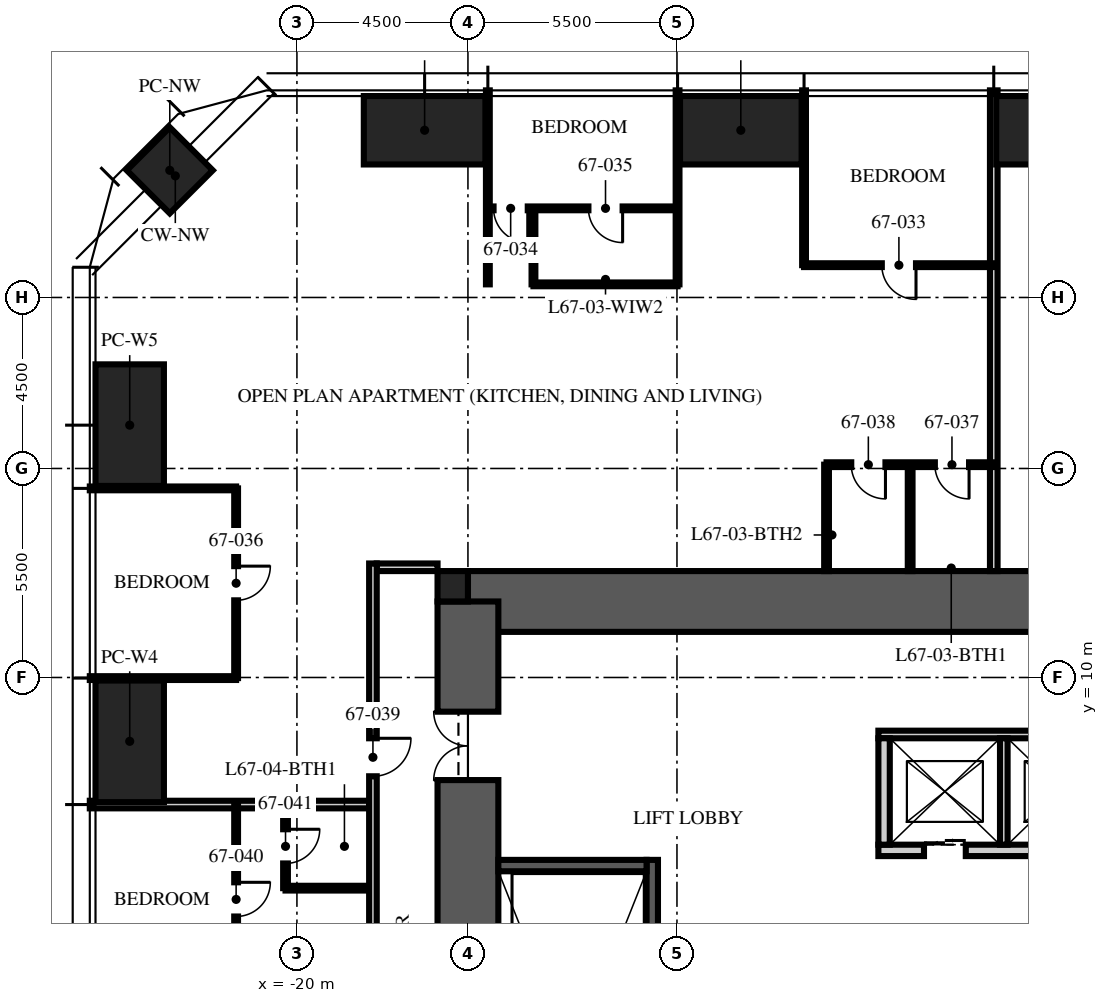
"""IFC4 building model, lengths in metres.
Left out: names, types, materials, properties, quantities, classifications, styles, units other than length and angle.
Written with IfcOpenShell. Run it as: python <this file> out.ifc"""

import sys

from ifc_helpers import new_model, si_unit, direction, frame, frame_2d, origin, origin_2d, place, context, subcontext, project, spatial, rectangle, hollow_rectangle, extrude, element, fill, save


model = new_model("IFC4")
c1 = context("Model", 3, precision=1e-05, world=origin(), true_north=direction((0.0, 1.0)))
c2 = subcontext(c1, "Body", "Model", "MODEL_VIEW")
j1 = project(units=[si_unit("LENGTHUNIT", "METRE"), si_unit("PLANEANGLEUNIT", "RADIAN")], contexts=[c1])
p1 = place(None, origin())
s1 = spatial("IfcSite", under=j1, at=p1, CompositionType="ELEMENT")
p2 = place(p1, origin())
s2 = spatial("IfcBuilding", under=s1, at=p2, CompositionType="ELEMENT")
p3 = place(p2, frame((0.0, 0.0, 267.0)))
s3 = spatial("IfcBuildingStorey", under=s2, at=p3, CompositionType="ELEMENT", Elevation=267.0)
p4 = place(p3, frame((-15.5, 12.0, -0.25), z_axis=(0.0, 0.0, 1.0), x_axis=(1.0, 0.0, 0.0)))
e1 = element("IfcWall", 1, at=p4, inside=s3, PredefinedType="SHEAR", context=c2, shape_type="SweptSolid", body=[
    extrude(rectangle(XDim=31.0, YDim=1.6, at=frame_2d((15.5, 0.0))), origin(), (0.0, 0.0, 1.0), 3.75),
])
p5 = place(p3, frame((-15.5, -12.0, -0.25), z_axis=(0.0, 0.0, 1.0), x_axis=(0.0, 1.0, 0.0)))
e2 = element("IfcWall", 2, at=p5, inside=s3, PredefinedType="SHEAR", context=c2, shape_type="SweptSolid", body=[
    extrude(rectangle(XDim=24.0, YDim=1.6, at=frame_2d((12.0, 0.0))), origin(), (0.0, 0.0, 1.0), 3.75),
])
p6 = place(p5, frame((3.2, 0.0, 0.25)))
e3 = element("IfcOpeningElement", 3, at=p6, cuts=e2, PredefinedType="OPENING", context=c2, shape_type="SweptSolid", body=[
    extrude(rectangle(XDim=1.2, YDim=2.1, at=frame_2d((0.6, 1.05))), frame((0.0, 0.81, 0.0), z_axis=(0.0, -1.0, 0.0), x_axis=(1.0, 0.0, 0.0)), (0.0, 0.0, 1.0), 1.62),
])
p7 = place(p5, frame((19.3, 0.0, 0.25)))
e4 = element("IfcOpeningElement", 4, at=p7, cuts=e2, PredefinedType="OPENING", context=c2, shape_type="SweptSolid", body=[
    extrude(rectangle(XDim=1.8, YDim=2.1, at=frame_2d((0.9, 1.05))), frame((0.0, 0.81, 0.0), z_axis=(0.0, -1.0, 0.0), x_axis=(1.0, 0.0, 0.0)), (0.0, 0.0, 1.0), 1.62),
])
p8 = place(p3, frame((-15.9, 12.4, -0.25), z_axis=(0.0, 0.0, 1.0), x_axis=(1.0, 0.0, 0.0)))
e5 = element("IfcColumn", 5, at=p8, inside=s3, PredefinedType="COLUMN", context=c2, shape_type="SweptSolid", body=[
    extrude(rectangle(XDim=0.8, YDim=0.8, at=origin_2d()), origin(), (0.0, 0.0, 1.0), 3.75),
])
for number, where, z_axis, x_axis in (
    (6, (-16.64, 24.4, 0.0), (0.0, 0.0, 1.0), (1.0, 0.0, 0.0)),
    (7, (-8.32, 24.4, 0.0), (0.0, 0.0, 1.0), (1.0, 0.0, 0.0)),
    (8, (0.0, 24.4, 0.0), (0.0, 0.0, 1.0), (1.0, 0.0, 0.0)),
    (9, (-24.4, 8.32, 0.0), (0.0, 0.0, 1.0), (0.0, 1.0, 0.0)),
    (10, (-24.4, 16.64, 0.0), (0.0, 0.0, 1.0), (0.0, 1.0, 0.0)),
):
    element("IfcColumn", number, at=place(p3, frame(where, z_axis=z_axis, x_axis=x_axis)), inside=s3, PredefinedType="COLUMN", context=c2, shape_type="SweptSolid", body=[
        extrude(hollow_rectangle(XDim=3.2, YDim=1.8, WallThickness=0.14, at=origin_2d()), origin(), (0.0, 0.0, 1.0), 3.75),
    ])
p9 = place(p3, frame((-23.346, 23.346, 0.0), z_axis=(0.0, 0.0, 1.0), x_axis=(0.707106781187, 0.707106781187, 0.0)))
e11 = element("IfcColumn", 11, at=p9, inside=s3, PredefinedType="COLUMN", context=c2, shape_type="SweptSolid", body=[
    extrude(hollow_rectangle(XDim=1.6, YDim=1.6, WallThickness=0.1, at=origin_2d()), origin(), (0.0, 0.0, 1.0), 3.75),
])
p10 = place(p3, frame((-10.65, -4.9, 0.0), z_axis=(0.0, 0.0, 1.0), x_axis=(0.0, 1.0, 0.0)))
e12 = element("IfcWall", 12, at=p10, inside=s3, PredefinedType="SOLIDWALL", context=c2, shape_type="SweptSolid", body=[
    extrude(rectangle(XDim=10.1, YDim=0.3, at=frame_2d((5.05, 0.0))), origin(), (0.0, 0.0, 1.0), 3.5),
])
p11 = place(p3, frame((-14.7, 5.05, 0.0), z_axis=(0.0, 0.0, 1.0), x_axis=(1.0, 0.0, 0.0)))
e13 = element("IfcWall", 13, at=p11, inside=s3, PredefinedType="SOLIDWALL", context=c2, shape_type="SweptSolid", body=[
    extrude(rectangle(XDim=3.9, YDim=0.3, at=frame_2d((1.95, 0.0))), origin(), (0.0, 0.0, 1.0), 3.5),
])
p12 = place(p3, frame((-4.7, 5.45, 0.0), z_axis=(0.0, 0.0, 1.0), x_axis=(1.0, 0.0, 0.0)))
e14 = element("IfcWall", 14, at=p12, inside=s3, PredefinedType="PARTITIONING", context=c2, shape_type="SweptSolid", body=[
    extrude(rectangle(XDim=9.7, YDim=0.3, at=frame_2d((4.85, 0.0))), origin(), (0.0, 0.0, 1.0), 3.5),
])
p13 = place(p12, frame((1.2, 0.0, 0.0)))
e15 = element("IfcOpeningElement", 15, at=p13, cuts=e14, PredefinedType="OPENING", context=c2, shape_type="SweptSolid", body=[
    extrude(rectangle(XDim=1.1, YDim=2.1, at=frame_2d((0.55, 1.05))), frame((0.0, 0.16, 0.0), z_axis=(0.0, -1.0, 0.0), x_axis=(1.0, 0.0, 0.0)), (0.0, 0.0, 1.0), 0.32),
])
p14 = place(p12, frame((4.3, 0.0, 0.0)))
e16 = element("IfcOpeningElement", 16, at=p14, cuts=e14, PredefinedType="OPENING", context=c2, shape_type="SweptSolid", body=[
    extrude(rectangle(XDim=1.1, YDim=2.1, at=frame_2d((0.55, 1.05))), frame((0.0, 0.16, 0.0), z_axis=(0.0, -1.0, 0.0), x_axis=(1.0, 0.0, 0.0)), (0.0, 0.0, 1.0), 0.32),
])
p15 = place(p12, frame((7.4, 0.0, 0.0)))
e17 = element("IfcOpeningElement", 17, at=p15, cuts=e14, PredefinedType="OPENING", context=c2, shape_type="SweptSolid", body=[
    extrude(rectangle(XDim=1.1, YDim=2.1, at=frame_2d((0.55, 1.05))), frame((0.0, 0.16, 0.0), z_axis=(0.0, -1.0, 0.0), x_axis=(1.0, 0.0, 0.0)), (0.0, 0.0, 1.0), 0.32),
])
p16 = place(p3, frame((-4.7, 8.5, 0.0), z_axis=(0.0, 0.0, 1.0), x_axis=(1.0, 0.0, 0.0)))
e18 = element("IfcWall", 18, at=p16, inside=s3, PredefinedType="PARTITIONING", context=c2, shape_type="SweptSolid", body=[
    extrude(rectangle(XDim=9.7, YDim=0.2, at=frame_2d((4.85, 0.0))), origin(), (0.0, 0.0, 1.0), 3.5),
])
p17 = place(p3, frame((-4.55, 5.6, 0.0), z_axis=(0.0, 0.0, 1.0), x_axis=(0.0, 1.0, 0.0)))
e19 = element("IfcWall", 19, at=p17, inside=s3, PredefinedType="PARTITIONING", context=c2, shape_type="SweptSolid", body=[
    extrude(rectangle(XDim=2.8, YDim=0.3, at=frame_2d((1.4, 0.0))), origin(), (0.0, 0.0, 1.0), 3.5),
])
p18 = place(p3, frame((-1.4, 5.6, 0.0), z_axis=(0.0, 0.0, 1.0), x_axis=(0.0, 1.0, 0.0)))
e20 = element("IfcWall", 20, at=p18, inside=s3, PredefinedType="PARTITIONING", context=c2, shape_type="SweptSolid", body=[
    extrude(rectangle(XDim=2.8, YDim=0.2, at=frame_2d((1.4, 0.0))), origin(), (0.0, 0.0, 1.0), 3.5),
])
p19 = place(p3, frame((-16.3, 12.9, 0.0), z_axis=(0.0, 0.0, 1.0), x_axis=(-1.0, 0.0, 0.0)))
e21 = element("IfcWall", 21, at=p19, inside=s3, PredefinedType="PARTITIONING", context=c2, shape_type="SweptSolid", body=[
    extrude(rectangle(XDim=1.6, YDim=0.2, at=frame_2d((0.8, 0.0))), origin(), (0.0, 0.0, 1.0), 2.3),
])
p20 = place(p3, frame((-1.664, 12.8, 0.0), z_axis=(0.0, 0.0, 1.0), x_axis=(0.0, 1.0, 0.0)))
e22 = element("IfcWall", 22, at=p20, inside=s3, PredefinedType="PARTITIONING", context=c2, shape_type="SweptSolid", body=[
    extrude(rectangle(XDim=12.65, YDim=0.2, at=frame_2d((6.325, 0.0))), origin(), (0.0, 0.0, 1.0), 2.91),
])
p21 = place(p3, frame((-6.656, 20.85, 0.0), z_axis=(0.0, 0.0, 1.0), x_axis=(0.0, 1.0, 0.0)))
e23 = element("IfcWall", 23, at=p21, inside=s3, PredefinedType="PARTITIONING", context=c2, shape_type="SweptSolid", body=[
    extrude(rectangle(XDim=4.6, YDim=0.1, at=frame_2d((2.3, 0.0))), origin(), (0.0, 0.0, 1.0), 2.91),
])
for number, where, z_axis, x_axis in (
    (24, (-9.984, 20.345, 0.0), (0.0, 0.0, 1.0), (0.0, 1.0, 0.0)),
    (25, (-14.976, 20.345, 0.0), (0.0, 0.0, 1.0), (0.0, 1.0, 0.0)),
):
    element("IfcWall", number, at=place(p3, frame(where, z_axis=z_axis, x_axis=x_axis)), inside=s3, PredefinedType="PARTITIONING", context=c2, shape_type="SweptSolid", body=[
        extrude(rectangle(XDim=5.105, YDim=0.1, at=frame_2d((2.552, 0.0))), origin(), (0.0, 0.0, 1.0), 2.91),
    ])
for number, where, z_axis, x_axis in (
    (26, (-21.6, 14.976, 0.0), (0.0, 0.0, 1.0), (-1.0, 0.0, 0.0)),
    (27, (-21.6, 9.984, 0.0), (0.0, 0.0, 1.0), (-1.0, 0.0, 0.0)),
):
    element("IfcWall", number, at=place(p3, frame(where, z_axis=z_axis, x_axis=x_axis)), inside=s3, PredefinedType="PARTITIONING", context=c2, shape_type="SweptSolid", body=[
        extrude(rectangle(XDim=3.85, YDim=0.1, at=frame_2d((1.925, 0.0))), origin(), (0.0, 0.0, 1.0), 2.91),
    ])
p22 = place(p3, frame((-18.1, 6.656, 0.0), z_axis=(0.0, 0.0, 1.0), x_axis=(-1.0, 0.0, 0.0)))
e28 = element("IfcWall", 28, at=p22, inside=s3, PredefinedType="PARTITIONING", context=c2, shape_type="SweptSolid", body=[
    extrude(rectangle(XDim=7.35, YDim=0.2, at=frame_2d((3.675, 0.0))), origin(), (0.0, 0.0, 1.0), 2.91),
])
p23 = place(p3, frame((-1.664, 20.85, 0.0), z_axis=(0.0, 0.0, 1.0), x_axis=(-1.0, 0.0, 0.0)))
e29 = element("IfcWall", 29, at=p23, inside=s3, PredefinedType="PARTITIONING", context=c2, shape_type="SweptSolid", body=[
    extrude(rectangle(XDim=4.992, YDim=0.1, at=frame_2d((2.496, 0.0))), origin(), (0.0, 0.0, 1.0), 2.81),
])
p24 = place(p23, frame((2.046, 0.0, 0.0)))
e30 = element("IfcOpeningElement", 30, at=p24, cuts=e29, PredefinedType="OPENING", context=c2, shape_type="SweptSolid", body=[
    extrude(rectangle(XDim=0.9, YDim=2.1, at=frame_2d((0.45, 1.05))), frame((0.0, 0.06, 0.0), z_axis=(0.0, -1.0, 0.0), x_axis=(1.0, 0.0, 0.0)), (0.0, 0.0, 1.0), 0.12),
])
p25 = place(p3, frame((-9.984, 22.345, 0.0), z_axis=(0.0, 0.0, 1.0), x_axis=(-1.0, 0.0, 0.0)))
e31 = element("IfcWall", 31, at=p25, inside=s3, PredefinedType="PARTITIONING", context=c2, shape_type="SweptSolid", body=[
    extrude(rectangle(XDim=4.992, YDim=0.1, at=frame_2d((2.496, 0.0))), origin(), (0.0, 0.0, 1.0), 2.81),
])
p26 = place(p25, frame((3.942, 0.0, 0.0)))
e32 = element("IfcOpeningElement", 32, at=p26, cuts=e31, PredefinedType="OPENING", context=c2, shape_type="SweptSolid", body=[
    extrude(rectangle(XDim=0.9, YDim=2.1, at=frame_2d((0.45, 1.05))), frame((0.0, 0.06, 0.0), z_axis=(0.0, -1.0, 0.0), x_axis=(1.0, 0.0, 0.0)), (0.0, 0.0, 1.0), 0.12),
])
p27 = place(p25, frame((1.446, 0.0, 0.0)))
e33 = element("IfcOpeningElement", 33, at=p27, cuts=e31, PredefinedType="OPENING", context=c2, shape_type="SweptSolid", body=[
    extrude(rectangle(XDim=0.9, YDim=2.1, at=frame_2d((0.45, 1.05))), frame((0.0, 0.06, 0.0), z_axis=(0.0, -1.0, 0.0), x_axis=(1.0, 0.0, 0.0)), (0.0, 0.0, 1.0), 0.12),
])
p28 = place(p3, frame((-13.776, 20.345, 0.0), z_axis=(0.0, 0.0, 1.0), x_axis=(0.0, 1.0, 0.0)))
e34 = element("IfcWall", 34, at=p28, inside=s3, PredefinedType="PARTITIONING", context=c2, shape_type="SweptSolid", body=[
    extrude(rectangle(XDim=2.0, YDim=0.1, at=frame_2d((1.0, 0.0))), origin(), (0.0, 0.0, 1.0), 3.5),
])
p29 = place(p3, frame((-9.984, 20.345, 0.0), z_axis=(0.0, 0.0, 1.0), x_axis=(-1.0, 0.0, 0.0)))
e35 = element("IfcWall", 35, at=p29, inside=s3, PredefinedType="PARTITIONING", context=c2, shape_type="SweptSolid", body=[
    extrude(rectangle(XDim=3.792, YDim=0.1, at=frame_2d((1.896, 0.0))), origin(), (0.0, 0.0, 1.0), 2.81),
])
p30 = place(p3, frame((-21.6, 14.976, 0.0), z_axis=(0.0, 0.0, 1.0), x_axis=(0.0, -1.0, 0.0)))
e36 = element("IfcWall", 36, at=p30, inside=s3, PredefinedType="PARTITIONING", context=c2, shape_type="SweptSolid", body=[
    extrude(rectangle(XDim=4.992, YDim=0.1, at=frame_2d((2.496, 0.0))), origin(), (0.0, 0.0, 1.0), 2.81),
])
p31 = place(p30, frame((2.046, 0.0, 0.0)))
e37 = element("IfcOpeningElement", 37, at=p31, cuts=e36, PredefinedType="OPENING", context=c2, shape_type="SweptSolid", body=[
    extrude(rectangle(XDim=0.9, YDim=2.1, at=frame_2d((0.45, 1.05))), frame((0.0, 0.06, 0.0), z_axis=(0.0, -1.0, 0.0), x_axis=(1.0, 0.0, 0.0)), (0.0, 0.0, 1.0), 0.12),
])
p32 = place(p3, frame((-1.664, 15.6, 0.0), z_axis=(0.0, 0.0, 1.0), x_axis=(-1.0, 0.0, 0.0)))
e38 = element("IfcWall", 38, at=p32, inside=s3, PredefinedType="PARTITIONING", context=c2, shape_type="SweptSolid", body=[
    extrude(rectangle(XDim=4.4, YDim=0.125, at=frame_2d((2.2, 0.0))), origin(), (0.0, 0.0, 1.0), 2.81),
])
p33 = place(p32, frame((0.65, 0.0, 0.0)))
e39 = element("IfcOpeningElement", 39, at=p33, cuts=e38, PredefinedType="OPENING", context=c2, shape_type="SweptSolid", body=[
    extrude(rectangle(XDim=0.9, YDim=2.1, at=frame_2d((0.45, 1.05))), frame((0.0, 0.073, 0.0), z_axis=(0.0, -1.0, 0.0), x_axis=(1.0, 0.0, 0.0)), (0.0, 0.0, 1.0), 0.145),
])
p34 = place(p32, frame((2.85, 0.0, 0.0)))
e40 = element("IfcOpeningElement", 40, at=p34, cuts=e38, PredefinedType="OPENING", context=c2, shape_type="SweptSolid", body=[
    extrude(rectangle(XDim=0.9, YDim=2.1, at=frame_2d((0.45, 1.05))), frame((0.0, 0.073, 0.0), z_axis=(0.0, -1.0, 0.0), x_axis=(1.0, 0.0, 0.0)), (0.0, 0.0, 1.0), 0.145),
])
for number, where, z_axis, x_axis in (
    (41, (-3.864, 12.8, 0.0), (0.0, 0.0, 1.0), (0.0, 1.0, 0.0)),
    (42, (-6.064, 12.8, 0.0), (0.0, 0.0, 1.0), (0.0, 1.0, 0.0)),
):
    element("IfcWall", number, at=place(p3, frame(where, z_axis=z_axis, x_axis=x_axis)), inside=s3, PredefinedType="PARTITIONING", context=c2, shape_type="SweptSolid", body=[
        extrude(rectangle(XDim=2.8, YDim=0.125, at=frame_2d((1.4, 0.0))), origin(), (0.0, 0.0, 1.0), 3.5),
    ])
p35 = place(p3, frame((-21.6, 6.656, 0.0), z_axis=(0.0, 0.0, 1.0), x_axis=(0.0, -1.0, 0.0)))
e43 = element("IfcWall", 43, at=p35, inside=s3, PredefinedType="PARTITIONING", context=c2, shape_type="SweptSolid", body=[
    extrude(rectangle(XDim=4.992, YDim=0.1, at=frame_2d((2.496, 0.0))), origin(), (0.0, 0.0, 1.0), 2.81),
])
p36 = place(p35, frame((2.046, 0.0, 0.0)))
e44 = element("IfcOpeningElement", 44, at=p36, cuts=e43, PredefinedType="OPENING", context=c2, shape_type="SweptSolid", body=[
    extrude(rectangle(XDim=0.9, YDim=2.1, at=frame_2d((0.45, 1.05))), frame((0.0, 0.06, 0.0), z_axis=(0.0, -1.0, 0.0), x_axis=(1.0, 0.0, 0.0)), (0.0, 0.0, 1.0), 0.12),
])
p37 = place(p3, frame((-20.3, 6.656, 0.0), z_axis=(0.0, 0.0, 1.0), x_axis=(0.0, -1.0, 0.0)))
e45 = element("IfcWall", 45, at=p37, inside=s3, PredefinedType="PARTITIONING", context=c2, shape_type="SweptSolid", body=[
    extrude(rectangle(XDim=2.2, YDim=0.125, at=frame_2d((1.1, 0.0))), origin(), (0.0, 0.0, 1.0), 3.5),
])
p38 = place(p37, frame((0.65, 0.0, 0.0)))
e46 = element("IfcOpeningElement", 46, at=p38, cuts=e45, PredefinedType="OPENING", context=c2, shape_type="SweptSolid", body=[
    extrude(rectangle(XDim=0.9, YDim=2.1, at=frame_2d((0.45, 1.05))), frame((0.0, 0.073, 0.0), z_axis=(0.0, -1.0, 0.0), x_axis=(1.0, 0.0, 0.0)), (0.0, 0.0, 1.0), 0.145),
])
p39 = place(p3, frame((-18.1, 4.456, 0.0), z_axis=(0.0, 0.0, 1.0), x_axis=(-1.0, 0.0, 0.0)))
e47 = element("IfcWall", 47, at=p39, inside=s3, PredefinedType="PARTITIONING", context=c2, shape_type="SweptSolid", body=[
    extrude(rectangle(XDim=2.2, YDim=0.125, at=frame_2d((1.1, 0.0))), origin(), (0.0, 0.0, 1.0), 3.5),
])
p40 = place(p3, frame((-18.0, 13.0, 0.0), z_axis=(0.0, 0.0, 1.0), x_axis=(0.0, -1.0, 0.0)))
e48 = element("IfcWall", 48, at=p40, inside=s3, PredefinedType="PARTITIONING", context=c2, shape_type="SweptSolid", body=[
    extrude(rectangle(XDim=26.0, YDim=0.2, at=frame_2d((13.0, 0.0))), origin(), (0.0, 0.0, 1.0), 2.6),
])
p41 = place(p40, frame((4.6, 0.0, 0.0)))
e49 = element("IfcOpeningElement", 49, at=p41, cuts=e48, PredefinedType="OPENING", context=c2, shape_type="SweptSolid", body=[
    extrude(rectangle(XDim=1.0, YDim=2.2, at=frame_2d((0.5, 1.1))), frame((0.0, 0.11, 0.0), z_axis=(0.0, -1.0, 0.0), x_axis=(1.0, 0.0, 0.0)), (0.0, 0.0, 1.0), 0.22),
])
p42 = place(p40, frame((13.114, 0.0, 0.0)))
e50 = element("IfcOpeningElement", 50, at=p42, cuts=e48, PredefinedType="OPENING", context=c2, shape_type="SweptSolid", body=[
    extrude(rectangle(XDim=1.0, YDim=2.2, at=frame_2d((0.5, 1.1))), frame((0.0, 0.11, 0.0), z_axis=(0.0, -1.0, 0.0), x_axis=(1.0, 0.0, 0.0)), (0.0, 0.0, 1.0), 0.22),
])
p43 = place(p40, frame((23.684, 0.0, 0.0)))
e51 = element("IfcOpeningElement", 51, at=p43, cuts=e48, PredefinedType="OPENING", context=c2, shape_type="SweptSolid", body=[
    extrude(rectangle(XDim=1.0, YDim=2.2, at=frame_2d((0.5, 1.1))), frame((0.0, 0.11, 0.0), z_axis=(0.0, -1.0, 0.0), x_axis=(1.0, 0.0, 0.0)), (0.0, 0.0, 1.0), 0.22),
])
p44 = place(p7, origin())
e52 = element("IfcDoor", 52, at=p44, inside=s3, OperationType="DOUBLE_DOOR_SINGLE_SWING", PredefinedType="DOOR", context=c2, shape_type="SweptSolid", body=[
    extrude(rectangle(XDim=1.8, YDim=2.1, at=frame_2d((0.9, 1.05))), frame((0.0, 0.025, 0.0), z_axis=(0.0, -1.0, 0.0), x_axis=(1.0, 0.0, 0.0)), (0.0, 0.0, 1.0), 0.05),
])
fill(e4, e52)
p45 = place(p13, origin())
e53 = element("IfcDoor", 53, at=p45, inside=s3, OperationType="DOUBLE_DOOR_SLIDING", PredefinedType="DOOR", context=c2, shape_type="SweptSolid", body=[
    extrude(rectangle(XDim=1.1, YDim=2.1, at=frame_2d((0.55, 1.05))), frame((0.0, 0.025, 0.0), z_axis=(0.0, -1.0, 0.0), x_axis=(1.0, 0.0, 0.0)), (0.0, 0.0, 1.0), 0.05),
])
fill(e15, e53)
p46 = place(p24, origin())
e54 = element("IfcDoor", 54, at=p46, inside=s3, OperationType="SINGLE_SWING_LEFT", PredefinedType="DOOR", context=c2, shape_type="SweptSolid", body=[
    extrude(rectangle(XDim=0.9, YDim=2.1, at=frame_2d((0.45, 1.05))), frame((0.0, 0.025, 0.0), z_axis=(0.0, -1.0, 0.0), x_axis=(1.0, 0.0, 0.0)), (0.0, 0.0, 1.0), 0.05),
])
fill(e30, e54)
p47 = place(p26, origin())
e55 = element("IfcDoor", 55, at=p47, inside=s3, OperationType="SINGLE_SWING_LEFT", PredefinedType="DOOR", context=c2, shape_type="SweptSolid", body=[
    extrude(rectangle(XDim=0.9, YDim=2.1, at=frame_2d((0.45, 1.05))), frame((0.0, 0.025, 0.0), z_axis=(0.0, -1.0, 0.0), x_axis=(1.0, 0.0, 0.0)), (0.0, 0.0, 1.0), 0.05),
])
fill(e32, e55)
p48 = place(p27, origin())
e56 = element("IfcDoor", 56, at=p48, inside=s3, OperationType="SINGLE_SWING_LEFT", PredefinedType="DOOR", context=c2, shape_type="SweptSolid", body=[
    extrude(rectangle(XDim=0.9, YDim=2.1, at=frame_2d((0.45, 1.05))), frame((0.0, 0.025, 0.0), z_axis=(0.0, -1.0, 0.0), x_axis=(1.0, 0.0, 0.0)), (0.0, 0.0, 1.0), 0.05),
])
fill(e33, e56)
p49 = place(p31, origin())
e57 = element("IfcDoor", 57, at=p49, inside=s3, OperationType="SINGLE_SWING_LEFT", PredefinedType="DOOR", context=c2, shape_type="SweptSolid", body=[
    extrude(rectangle(XDim=0.9, YDim=2.1, at=frame_2d((0.45, 1.05))), frame((0.0, 0.025, 0.0), z_axis=(0.0, -1.0, 0.0), x_axis=(1.0, 0.0, 0.0)), (0.0, 0.0, 1.0), 0.05),
])
fill(e37, e57)
p50 = place(p33, origin())
e58 = element("IfcDoor", 58, at=p50, inside=s3, OperationType="SINGLE_SWING_LEFT", PredefinedType="DOOR", context=c2, shape_type="SweptSolid", body=[
    extrude(rectangle(XDim=0.9, YDim=2.1, at=frame_2d((0.45, 1.05))), frame((0.0, 0.025, 0.0), z_axis=(0.0, -1.0, 0.0), x_axis=(1.0, 0.0, 0.0)), (0.0, 0.0, 1.0), 0.05),
])
fill(e39, e58)
p51 = place(p34, origin())
e59 = element("IfcDoor", 59, at=p51, inside=s3, OperationType="SINGLE_SWING_LEFT", PredefinedType="DOOR", context=c2, shape_type="SweptSolid", body=[
    extrude(rectangle(XDim=0.9, YDim=2.1, at=frame_2d((0.45, 1.05))), frame((0.0, 0.025, 0.0), z_axis=(0.0, -1.0, 0.0), x_axis=(1.0, 0.0, 0.0)), (0.0, 0.0, 1.0), 0.05),
])
fill(e40, e59)
p52 = place(p41, origin())
e60 = element("IfcDoor", 60, at=p52, inside=s3, OperationType="SINGLE_SWING_LEFT", PredefinedType="DOOR", context=c2, shape_type="SweptSolid", body=[
    extrude(rectangle(XDim=1.0, YDim=2.2, at=frame_2d((0.5, 1.1))), frame((0.0, 0.025, 0.0), z_axis=(0.0, -1.0, 0.0), x_axis=(1.0, 0.0, 0.0)), (0.0, 0.0, 1.0), 0.05),
])
fill(e49, e60)
p53 = place(p36, origin())
e61 = element("IfcDoor", 61, at=p53, inside=s3, OperationType="SINGLE_SWING_LEFT", PredefinedType="DOOR", context=c2, shape_type="SweptSolid", body=[
    extrude(rectangle(XDim=0.9, YDim=2.1, at=frame_2d((0.45, 1.05))), frame((0.0, 0.025, 0.0), z_axis=(0.0, -1.0, 0.0), x_axis=(1.0, 0.0, 0.0)), (0.0, 0.0, 1.0), 0.05),
])
fill(e44, e61)
p54 = place(p38, origin())
e62 = element("IfcDoor", 62, at=p54, inside=s3, OperationType="SINGLE_SWING_LEFT", PredefinedType="DOOR", context=c2, shape_type="SweptSolid", body=[
    extrude(rectangle(XDim=0.9, YDim=2.1, at=frame_2d((0.45, 1.05))), frame((0.0, 0.025, 0.0), z_axis=(0.0, -1.0, 0.0), x_axis=(1.0, 0.0, 0.0)), (0.0, 0.0, 1.0), 0.05),
])
fill(e46, e62)
save(model, sys.argv[1])
